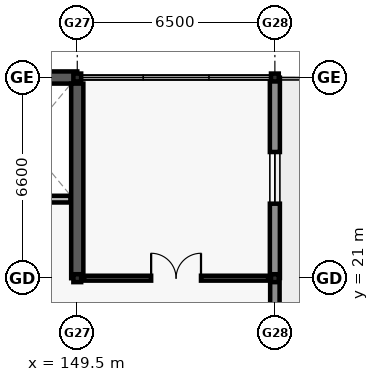
"""IFC4 building model, lengths in metres.
Left out: names, types, materials, properties, quantities, classifications, styles, units other than length and angle.
Written with IfcOpenShell. Run it as: python <this file> out.ifc"""

import sys

from ifc_helpers import new_model, si_unit, direction, frame, frame_2d, origin, origin_2d, place, context, subcontext, project, spatial, rectangle, i_section, extrude, element, fill, save


model = new_model("IFC4")
c1 = context("Model", 3, precision=1e-05, world=origin(), true_north=direction((0.0, 1.0)))
c2 = subcontext(c1, "Body", "Model", "MODEL_VIEW")
j1 = project(units=[si_unit("LENGTHUNIT", "METRE"), si_unit("PLANEANGLEUNIT", "RADIAN")], contexts=[c1])
p1 = place(None, origin())
s1 = spatial("IfcSite", under=j1, at=p1, CompositionType="ELEMENT")
p2 = place(p1, origin())
s2 = spatial("IfcBuilding", under=s1, at=p2, CompositionType="ELEMENT")
p3 = place(p2, frame((0.0, 0.0, 17.4)))
s3 = spatial("IfcBuildingStorey", under=s2, at=p3, CompositionType="ELEMENT", Elevation=17.4)
for number, where, z_axis, x_axis in (
    (1, (149.5, 21.0, 0.0), (0.0, 0.0, 1.0), (1.0, 0.0, 0.0)),
    (2, (149.5, 27.6, 0.0), (0.0, 0.0, 1.0), (1.0, 0.0, 0.0)),
    (3, (156.0, 21.0, 0.0), (0.0, 0.0, 1.0), (1.0, 0.0, 0.0)),
    (4, (156.0, 27.6, 0.0), (0.0, 0.0, 1.0), (1.0, 0.0, 0.0)),
):
    element("IfcColumn", number, at=place(p3, frame(where, z_axis=z_axis, x_axis=x_axis)), inside=s3, PredefinedType="COLUMN", context=c2, shape_type="SweptSolid", body=[
        extrude(i_section(OverallWidth=0.256, OverallDepth=0.26, WebThickness=0.01, FlangeThickness=0.017, FilletRadius=0.013, at=origin_2d()), origin(), (0.0, 0.0, 1.0), 3.9),
    ])
p4 = place(p3, frame((143.0, 27.6, 0.0), z_axis=(0.0, 0.0, 1.0), x_axis=(1.0, 0.0, 0.0)))
e5 = element("IfcWall", 5, at=p4, inside=s3, PredefinedType="SHEAR", context=c2, shape_type="SweptSolid", body=[
    extrude(rectangle(XDim=6.5, YDim=0.4, at=frame_2d((3.25, 0.0))), origin(), (0.0, 0.0, 1.0), 3.66),
])
p5 = place(p3, frame((149.5, 21.0, 0.0), z_axis=(0.0, 0.0, 1.0), x_axis=(0.0, 1.0, 0.0)))
e6 = element("IfcWall", 6, at=p5, inside=s3, PredefinedType="SHEAR", context=c2, shape_type="SweptSolid", body=[
    extrude(rectangle(XDim=6.4, YDim=0.4, at=frame_2d((3.2, 0.0))), origin(), (0.0, 0.0, 1.0), 3.66),
])
p6 = place(p3, frame((156.0, 20.995, 0.0), z_axis=(0.0, 0.0, 1.0), x_axis=(0.0, -1.0, 0.0)))
e7 = element("IfcWall", 7, at=p6, inside=s3, PredefinedType="SOLIDWALL", context=c2, shape_type="SweptSolid", body=[
    extrude(rectangle(XDim=6.59, YDim=0.31, at=frame_2d((3.295, 0.0))), origin(), (0.0, 0.0, 1.0), 3.02),
])
p7 = place(p6, frame((2.785, 0.0, 0.0)))
e8 = element("IfcOpeningElement", 8, at=p7, cuts=e7, PredefinedType="OPENING", context=c2, shape_type="SweptSolid", body=[
    extrude(rectangle(XDim=1.02, YDim=2.14, at=frame_2d((0.51, 1.07))), frame((0.0, 0.165, 0.0), z_axis=(0.0, -1.0, 0.0), x_axis=(1.0, 0.0, 0.0)), (0.0, 0.0, 1.0), 0.33),
])
p8 = place(p3, frame((156.0, 27.595, 0.0), z_axis=(0.0, 0.0, 1.0), x_axis=(0.0, -1.0, 0.0)))
e9 = element("IfcWall", 9, at=p8, inside=s3, PredefinedType="SOLIDWALL", context=c2, shape_type="SweptSolid", body=[
    extrude(rectangle(XDim=6.59, YDim=0.33, at=frame_2d((3.295, 0.0))), origin(), (0.0, 0.0, 1.0), 3.02),
])
p9 = place(p8, frame((2.445, 0.0, 0.8)))
e10 = element("IfcOpeningElement", 10, at=p9, cuts=e9, PredefinedType="OPENING", context=c2, shape_type="SweptSolid", body=[
    extrude(rectangle(XDim=1.7, YDim=1.95, at=frame_2d((0.85, 0.975))), frame((0.0, 0.175, 0.0), z_axis=(0.0, -1.0, 0.0), x_axis=(1.0, 0.0, 0.0)), (0.0, 0.0, 1.0), 0.35),
])
p10 = place(p3, frame((146.24, 23.6, 0.0), z_axis=(0.0, 0.0, 1.0), x_axis=(1.0, 0.0, 0.0)))
e11 = element("IfcWall", 11, at=p10, inside=s3, PredefinedType="SOLIDWALL", context=c2, shape_type="SweptSolid", body=[
    extrude(rectangle(XDim=3.035, YDim=0.22, at=frame_2d((1.518, 0.0))), origin(), (0.0, 0.0, 1.0), 3.66),
])
p11 = place(p10, frame((0.968, 0.0, 0.0)))
e12 = element("IfcOpeningElement", 12, at=p11, cuts=e11, PredefinedType="OPENING", context=c2, shape_type="SweptSolid", body=[
    extrude(rectangle(XDim=1.1, YDim=2.1, at=frame_2d((0.55, 1.05))), frame((0.0, 0.12, 0.0), z_axis=(0.0, -1.0, 0.0), x_axis=(1.0, 0.0, 0.0)), (0.0, 0.0, 1.0), 0.24),
])
p12 = place(p3, frame((149.72, 21.0, 0.0), z_axis=(0.0, 0.0, 1.0), x_axis=(1.0, 0.0, 0.0)))
e13 = element("IfcWall", 13, at=p12, inside=s3, PredefinedType="PARTITIONING", context=c2, shape_type="SweptSolid", body=[
    extrude(rectangle(XDim=6.06, YDim=0.16, at=frame_2d((3.03, 0.0))), origin(), (0.0, 0.0, 1.0), 3.0),
])
p13 = place(p12, frame((2.21, 0.0, 0.0)))
e14 = element("IfcOpeningElement", 14, at=p13, cuts=e13, PredefinedType="OPENING", context=c2, shape_type="SweptSolid", body=[
    extrude(rectangle(XDim=1.64, YDim=2.2, at=frame_2d((0.82, 1.1))), frame((0.0, 0.09, 0.0), z_axis=(0.0, -1.0, 0.0), x_axis=(1.0, 0.0, 0.0)), (0.0, 0.0, 1.0), 0.18),
])
p14 = place(p9, origin())
e15 = element("IfcWindow", 15, at=p14, inside=s3, PartitioningType="DOUBLE_PANEL_VERTICAL", PredefinedType="WINDOW", context=c2, shape_type="SweptSolid", body=[
    extrude(rectangle(XDim=1.7, YDim=1.95, at=frame_2d((0.85, 0.975))), frame((0.0, 0.03, 0.0), z_axis=(0.0, -1.0, 0.0), x_axis=(1.0, 0.0, 0.0)), (0.0, 0.0, 1.0), 0.06),
])
fill(e10, e15)
p15 = place(p13, origin())
e16 = element("IfcDoor", 16, at=p15, inside=s3, OperationType="DOUBLE_DOOR_SINGLE_SWING", PredefinedType="DOOR", context=c2, shape_type="SweptSolid", body=[
    extrude(rectangle(XDim=1.64, YDim=2.2, at=frame_2d((0.82, 1.1))), frame((0.0, 0.025, 0.0), z_axis=(0.0, -1.0, 0.0), x_axis=(1.0, 0.0, 0.0)), (0.0, 0.0, 1.0), 0.05),
])
fill(e14, e16)
save(model, sys.argv[1])
